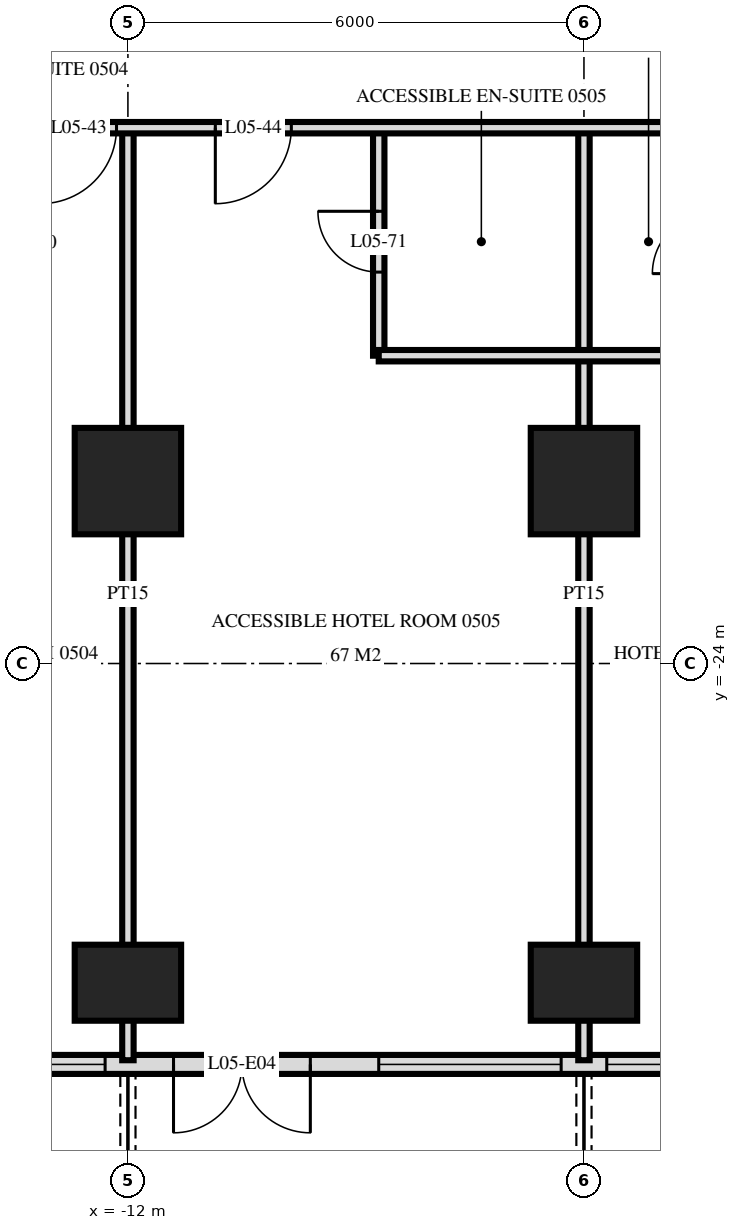
"""IFC4 building model, lengths in metres.
Left out: names, types, materials, properties, quantities, classifications, styles, units other than length and angle.
Written with IfcOpenShell. Run it as: python <this file> out.ifc"""

import sys

from ifc_helpers import new_model, si_unit, direction, frame, frame_2d, origin, origin_2d, place, context, subcontext, project, spatial, rectangle, extrude, element, fill, save


model = new_model("IFC4")
c1 = context("Model", 3, precision=1e-05, world=origin(), true_north=direction((0.0, 1.0)))
c2 = subcontext(c1, "Body", "Model", "MODEL_VIEW")
j1 = project(units=[si_unit("LENGTHUNIT", "METRE"), si_unit("PLANEANGLEUNIT", "RADIAN")], contexts=[c1])
p1 = place(None, origin())
s1 = spatial("IfcSite", under=j1, at=p1, CompositionType="ELEMENT")
p2 = place(p1, origin())
s2 = spatial("IfcBuilding", under=s1, at=p2, CompositionType="ELEMENT")
p3 = place(p2, frame((0.0, 0.0, 27.6)))
s3 = spatial("IfcBuildingStorey", under=s2, at=p3, CompositionType="ELEMENT", Elevation=27.6)
p4 = place(p3, frame((-12.0, -28.2, 0.0), z_axis=(0.0, 0.0, 1.0), x_axis=(1.0, 0.0, 0.0)))
e1 = element("IfcColumn", 1, at=p4, inside=s3, PredefinedType="COLUMN", context=c2, shape_type="SweptSolid", body=[
    extrude(rectangle(XDim=1.4, YDim=1.0, at=origin_2d()), origin(), (0.0, 0.0, 1.0), 3.6),
])
p5 = place(p3, frame((-12.0, -21.6, 0.0), z_axis=(0.0, 0.0, 1.0), x_axis=(1.0, 0.0, 0.0)))
e2 = element("IfcColumn", 2, at=p5, inside=s3, PredefinedType="COLUMN", context=c2, shape_type="SweptSolid", body=[
    extrude(rectangle(XDim=1.4, YDim=1.4, at=origin_2d()), origin(), (0.0, 0.0, 1.0), 3.6),
])
p6 = place(p3, frame((-6.0, -28.2, 0.0), z_axis=(0.0, 0.0, 1.0), x_axis=(1.0, 0.0, 0.0)))
e3 = element("IfcColumn", 3, at=p6, inside=s3, PredefinedType="COLUMN", context=c2, shape_type="SweptSolid", body=[
    extrude(rectangle(XDim=1.4, YDim=1.0, at=origin_2d()), origin(), (0.0, 0.0, 1.0), 3.6),
])
p7 = place(p3, frame((-6.0, -21.6, 0.0), z_axis=(0.0, 0.0, 1.0), x_axis=(1.0, 0.0, 0.0)))
e4 = element("IfcColumn", 4, at=p7, inside=s3, PredefinedType="COLUMN", context=c2, shape_type="SweptSolid", body=[
    extrude(rectangle(XDim=1.4, YDim=1.4, at=origin_2d()), origin(), (0.0, 0.0, 1.0), 3.6),
])
p8 = place(p3, frame((-28.775, -29.275, 0.0), z_axis=(0.0, 0.0, 1.0), x_axis=(1.0, 0.0, 0.0)))
e5 = element("IfcWall", 5, at=p8, inside=s3, PredefinedType="SOLIDWALL", context=c2, shape_type="SweptSolid", body=[
    extrude(rectangle(XDim=57.551, YDim=0.25, at=frame_2d((28.775, 0.0))), origin(), (0.0, 0.0, 1.0), 3.32),
])
p9 = place(p8, frame((0.575, 0.0, 0.0)))
e6 = element("IfcOpeningElement", 6, at=p9, cuts=e5, PredefinedType="OPENING", context=c2, shape_type="SweptSolid", body=[
    extrude(rectangle(XDim=1.8, YDim=2.4, at=frame_2d((0.9, 1.2))), frame((0.0, 0.135, 0.0), z_axis=(0.0, -1.0, 0.0), x_axis=(1.0, 0.0, 0.0)), (0.0, 0.0, 1.0), 0.27),
])
p10 = place(p8, frame((5.375, 0.0, 0.0)))
e7 = element("IfcOpeningElement", 7, at=p10, cuts=e5, PredefinedType="OPENING", context=c2, shape_type="SweptSolid", body=[
    extrude(rectangle(XDim=1.8, YDim=2.4, at=frame_2d((0.9, 1.2))), frame((0.0, 0.135, 0.0), z_axis=(0.0, -1.0, 0.0), x_axis=(1.0, 0.0, 0.0)), (0.0, 0.0, 1.0), 0.27),
])
p11 = place(p8, frame((8.075, 0.0, 0.3)))
e8 = element("IfcOpeningElement", 8, at=p11, cuts=e5, PredefinedType="OPENING", context=c2, shape_type="SweptSolid", body=[
    extrude(rectangle(XDim=2.4, YDim=2.1, at=frame_2d((1.2, 1.05))), frame((0.0, 0.135, 0.0), z_axis=(0.0, -1.0, 0.0), x_axis=(1.0, 0.0, 0.0)), (0.0, 0.0, 1.0), 0.27),
])
p12 = place(p8, frame((11.375, 0.0, 0.0)))
e9 = element("IfcOpeningElement", 9, at=p12, cuts=e5, PredefinedType="OPENING", context=c2, shape_type="SweptSolid", body=[
    extrude(rectangle(XDim=1.8, YDim=2.4, at=frame_2d((0.9, 1.2))), frame((0.0, 0.135, 0.0), z_axis=(0.0, -1.0, 0.0), x_axis=(1.0, 0.0, 0.0)), (0.0, 0.0, 1.0), 0.27),
])
p13 = place(p8, frame((14.075, 0.0, 0.3)))
e10 = element("IfcOpeningElement", 10, at=p13, cuts=e5, PredefinedType="OPENING", context=c2, shape_type="SweptSolid", body=[
    extrude(rectangle(XDim=2.4, YDim=2.1, at=frame_2d((1.2, 1.05))), frame((0.0, 0.135, 0.0), z_axis=(0.0, -1.0, 0.0), x_axis=(1.0, 0.0, 0.0)), (0.0, 0.0, 1.0), 0.27),
])
p14 = place(p8, frame((17.375, 0.0, 0.0)))
e11 = element("IfcOpeningElement", 11, at=p14, cuts=e5, PredefinedType="OPENING", context=c2, shape_type="SweptSolid", body=[
    extrude(rectangle(XDim=1.8, YDim=2.4, at=frame_2d((0.9, 1.2))), frame((0.0, 0.135, 0.0), z_axis=(0.0, -1.0, 0.0), x_axis=(1.0, 0.0, 0.0)), (0.0, 0.0, 1.0), 0.27),
])
p15 = place(p8, frame((20.075, 0.0, 0.3)))
e12 = element("IfcOpeningElement", 12, at=p15, cuts=e5, PredefinedType="OPENING", context=c2, shape_type="SweptSolid", body=[
    extrude(rectangle(XDim=2.4, YDim=2.1, at=frame_2d((1.2, 1.05))), frame((0.0, 0.135, 0.0), z_axis=(0.0, -1.0, 0.0), x_axis=(1.0, 0.0, 0.0)), (0.0, 0.0, 1.0), 0.27),
])
p16 = place(p8, frame((23.075, 0.0, 0.3)))
e13 = element("IfcOpeningElement", 13, at=p16, cuts=e5, PredefinedType="OPENING", context=c2, shape_type="SweptSolid", body=[
    extrude(rectangle(XDim=2.4, YDim=2.1, at=frame_2d((1.2, 1.05))), frame((0.0, 0.135, 0.0), z_axis=(0.0, -1.0, 0.0), x_axis=(1.0, 0.0, 0.0)), (0.0, 0.0, 1.0), 0.27),
])
p17 = place(p8, frame((26.375, 0.0, 0.0)))
e14 = element("IfcOpeningElement", 14, at=p17, cuts=e5, PredefinedType="OPENING", context=c2, shape_type="SweptSolid", body=[
    extrude(rectangle(XDim=1.8, YDim=2.4, at=frame_2d((0.9, 1.2))), frame((0.0, 0.135, 0.0), z_axis=(0.0, -1.0, 0.0), x_axis=(1.0, 0.0, 0.0)), (0.0, 0.0, 1.0), 0.27),
])
p18 = place(p8, frame((29.375, 0.0, 0.0)))
e15 = element("IfcOpeningElement", 15, at=p18, cuts=e5, PredefinedType="OPENING", context=c2, shape_type="SweptSolid", body=[
    extrude(rectangle(XDim=1.8, YDim=2.4, at=frame_2d((0.9, 1.2))), frame((0.0, 0.135, 0.0), z_axis=(0.0, -1.0, 0.0), x_axis=(1.0, 0.0, 0.0)), (0.0, 0.0, 1.0), 0.27),
])
p19 = place(p8, frame((32.075, 0.0, 0.3)))
e16 = element("IfcOpeningElement", 16, at=p19, cuts=e5, PredefinedType="OPENING", context=c2, shape_type="SweptSolid", body=[
    extrude(rectangle(XDim=2.4, YDim=2.1, at=frame_2d((1.2, 1.05))), frame((0.0, 0.135, 0.0), z_axis=(0.0, -1.0, 0.0), x_axis=(1.0, 0.0, 0.0)), (0.0, 0.0, 1.0), 0.27),
])
p20 = place(p8, frame((35.375, 0.0, 0.0)))
e17 = element("IfcOpeningElement", 17, at=p20, cuts=e5, PredefinedType="OPENING", context=c2, shape_type="SweptSolid", body=[
    extrude(rectangle(XDim=1.8, YDim=2.4, at=frame_2d((0.9, 1.2))), frame((0.0, 0.135, 0.0), z_axis=(0.0, -1.0, 0.0), x_axis=(1.0, 0.0, 0.0)), (0.0, 0.0, 1.0), 0.27),
])
p21 = place(p8, frame((38.075, 0.0, 0.3)))
e18 = element("IfcOpeningElement", 18, at=p21, cuts=e5, PredefinedType="OPENING", context=c2, shape_type="SweptSolid", body=[
    extrude(rectangle(XDim=2.4, YDim=2.1, at=frame_2d((1.2, 1.05))), frame((0.0, 0.135, 0.0), z_axis=(0.0, -1.0, 0.0), x_axis=(1.0, 0.0, 0.0)), (0.0, 0.0, 1.0), 0.27),
])
p22 = place(p8, frame((41.375, 0.0, 0.0)))
e19 = element("IfcOpeningElement", 19, at=p22, cuts=e5, PredefinedType="OPENING", context=c2, shape_type="SweptSolid", body=[
    extrude(rectangle(XDim=1.8, YDim=2.4, at=frame_2d((0.9, 1.2))), frame((0.0, 0.135, 0.0), z_axis=(0.0, -1.0, 0.0), x_axis=(1.0, 0.0, 0.0)), (0.0, 0.0, 1.0), 0.27),
])
p23 = place(p8, frame((44.075, 0.0, 0.3)))
e20 = element("IfcOpeningElement", 20, at=p23, cuts=e5, PredefinedType="OPENING", context=c2, shape_type="SweptSolid", body=[
    extrude(rectangle(XDim=2.4, YDim=2.1, at=frame_2d((1.2, 1.05))), frame((0.0, 0.135, 0.0), z_axis=(0.0, -1.0, 0.0), x_axis=(1.0, 0.0, 0.0)), (0.0, 0.0, 1.0), 0.27),
])
p24 = place(p8, frame((47.075, 0.0, 0.3)))
e21 = element("IfcOpeningElement", 21, at=p24, cuts=e5, PredefinedType="OPENING", context=c2, shape_type="SweptSolid", body=[
    extrude(rectangle(XDim=2.4, YDim=2.1, at=frame_2d((1.2, 1.05))), frame((0.0, 0.135, 0.0), z_axis=(0.0, -1.0, 0.0), x_axis=(1.0, 0.0, 0.0)), (0.0, 0.0, 1.0), 0.27),
])
p25 = place(p8, frame((50.375, 0.0, 0.0)))
e22 = element("IfcOpeningElement", 22, at=p25, cuts=e5, PredefinedType="OPENING", context=c2, shape_type="SweptSolid", body=[
    extrude(rectangle(XDim=1.8, YDim=2.4, at=frame_2d((0.9, 1.2))), frame((0.0, 0.135, 0.0), z_axis=(0.0, -1.0, 0.0), x_axis=(1.0, 0.0, 0.0)), (0.0, 0.0, 1.0), 0.27),
])
p26 = place(p8, frame((53.375, 0.0, 0.0)))
e23 = element("IfcOpeningElement", 23, at=p26, cuts=e5, PredefinedType="OPENING", context=c2, shape_type="SweptSolid", body=[
    extrude(rectangle(XDim=1.8, YDim=2.4, at=frame_2d((0.9, 1.2))), frame((0.0, 0.135, 0.0), z_axis=(0.0, -1.0, 0.0), x_axis=(1.0, 0.0, 0.0)), (0.0, 0.0, 1.0), 0.27),
])
p27 = place(p3, frame((-6.0, -29.22, 0.0), z_axis=(0.0, 0.0, 1.0), x_axis=(0.0, 1.0, 0.0)))
e24 = element("IfcWall", 24, at=p27, inside=s3, PredefinedType="PARTITIONING", context=c2, shape_type="SweptSolid", body=[
    extrude(rectangle(XDim=12.27, YDim=0.15, at=frame_2d((6.135, 0.0))), origin(), (0.0, 0.0, 1.0), 3.32),
])
p28 = place(p3, frame((-8.7, -19.95, 0.0), z_axis=(0.0, 0.0, 1.0), x_axis=(0.0, 1.0, 0.0)))
e25 = element("IfcWall", 25, at=p28, inside=s3, PredefinedType="PARTITIONING", context=c2, shape_type="SweptSolid", body=[
    extrude(rectangle(XDim=3.0, YDim=0.15, at=frame_2d((1.5, 0.0))), origin(), (0.0, 0.0, 1.0), 3.32),
])
p29 = place(p28, frame((1.1, 0.0, 0.0)))
e26 = element("IfcOpeningElement", 26, at=p29, cuts=e25, PredefinedType="OPENING", context=c2, shape_type="SweptSolid", body=[
    extrude(rectangle(XDim=0.8, YDim=2.1, at=frame_2d((0.4, 1.05))), frame((0.0, 0.085, 0.0), z_axis=(0.0, -1.0, 0.0), x_axis=(1.0, 0.0, 0.0)), (0.0, 0.0, 1.0), 0.17),
])
p30 = place(p3, frame((-12.0, -29.22, 0.0), z_axis=(0.0, 0.0, 1.0), x_axis=(0.0, 1.0, 0.0)))
e27 = element("IfcWall", 27, at=p30, inside=s3, PredefinedType="PARTITIONING", context=c2, shape_type="SweptSolid", body=[
    extrude(rectangle(XDim=12.27, YDim=0.15, at=frame_2d((6.135, 0.0))), origin(), (0.0, 0.0, 1.0), 3.32),
])
p31 = place(p3, frame((-8.7, -19.95, 0.0), z_axis=(0.0, 0.0, 1.0), x_axis=(1.0, 0.0, 0.0)))
e28 = element("IfcWall", 28, at=p31, inside=s3, PredefinedType="PARTITIONING", context=c2, shape_type="SweptSolid", body=[
    extrude(rectangle(XDim=4.4, YDim=0.15, at=frame_2d((2.2, 0.0))), origin(), (0.0, 0.0, 1.0), 3.32),
])
p32 = place(p3, frame((-33.12, -16.95, 0.0), z_axis=(0.0, 0.0, 1.0), x_axis=(1.0, 0.0, 0.0)))
e29 = element("IfcWall", 29, at=p32, inside=s3, PredefinedType="PARTITIONING", context=c2, shape_type="SweptSolid", body=[
    extrude(rectangle(XDim=66.24, YDim=0.15, at=frame_2d((33.12, 0.0))), origin(), (0.0, 0.0, 1.0), 3.32),
])
p33 = place(p32, frame((9.27, 0.0, 0.0)))
e30 = element("IfcOpeningElement", 30, at=p33, cuts=e29, PredefinedType="OPENING", context=c2, shape_type="SweptSolid", body=[
    extrude(rectangle(XDim=1.0, YDim=2.1, at=frame_2d((0.5, 1.05))), frame((0.0, 0.085, 0.0), z_axis=(0.0, -1.0, 0.0), x_axis=(1.0, 0.0, 0.0)), (0.0, 0.0, 1.0), 0.17),
])
p34 = place(p32, frame((13.97, 0.0, 0.0)))
e31 = element("IfcOpeningElement", 31, at=p34, cuts=e29, PredefinedType="OPENING", context=c2, shape_type="SweptSolid", body=[
    extrude(rectangle(XDim=1.0, YDim=2.1, at=frame_2d((0.5, 1.05))), frame((0.0, 0.085, 0.0), z_axis=(0.0, -1.0, 0.0), x_axis=(1.0, 0.0, 0.0)), (0.0, 0.0, 1.0), 0.17),
])
p35 = place(p32, frame((15.27, 0.0, 0.0)))
e32 = element("IfcOpeningElement", 32, at=p35, cuts=e29, PredefinedType="OPENING", context=c2, shape_type="SweptSolid", body=[
    extrude(rectangle(XDim=1.0, YDim=2.1, at=frame_2d((0.5, 1.05))), frame((0.0, 0.085, 0.0), z_axis=(0.0, -1.0, 0.0), x_axis=(1.0, 0.0, 0.0)), (0.0, 0.0, 1.0), 0.17),
])
p36 = place(p32, frame((19.97, 0.0, 0.0)))
e33 = element("IfcOpeningElement", 33, at=p36, cuts=e29, PredefinedType="OPENING", context=c2, shape_type="SweptSolid", body=[
    extrude(rectangle(XDim=1.0, YDim=2.1, at=frame_2d((0.5, 1.05))), frame((0.0, 0.085, 0.0), z_axis=(0.0, -1.0, 0.0), x_axis=(1.0, 0.0, 0.0)), (0.0, 0.0, 1.0), 0.17),
])
p37 = place(p32, frame((22.27, 0.0, 0.0)))
e34 = element("IfcOpeningElement", 34, at=p37, cuts=e29, PredefinedType="OPENING", context=c2, shape_type="SweptSolid", body=[
    extrude(rectangle(XDim=1.0, YDim=2.1, at=frame_2d((0.5, 1.05))), frame((0.0, 0.085, 0.0), z_axis=(0.0, -1.0, 0.0), x_axis=(1.0, 0.0, 0.0)), (0.0, 0.0, 1.0), 0.17),
])
p38 = place(p32, frame((28.97, 0.0, 0.0)))
e35 = element("IfcOpeningElement", 35, at=p38, cuts=e29, PredefinedType="OPENING", context=c2, shape_type="SweptSolid", body=[
    extrude(rectangle(XDim=1.0, YDim=2.1, at=frame_2d((0.5, 1.05))), frame((0.0, 0.085, 0.0), z_axis=(0.0, -1.0, 0.0), x_axis=(1.0, 0.0, 0.0)), (0.0, 0.0, 1.0), 0.17),
])
p39 = place(p32, frame((30.27, 0.0, 0.0)))
e36 = element("IfcOpeningElement", 36, at=p39, cuts=e29, PredefinedType="OPENING", context=c2, shape_type="SweptSolid", body=[
    extrude(rectangle(XDim=1.0, YDim=2.1, at=frame_2d((0.5, 1.05))), frame((0.0, 0.085, 0.0), z_axis=(0.0, -1.0, 0.0), x_axis=(1.0, 0.0, 0.0)), (0.0, 0.0, 1.0), 0.17),
])
p40 = place(p32, frame((34.97, 0.0, 0.0)))
e37 = element("IfcOpeningElement", 37, at=p40, cuts=e29, PredefinedType="OPENING", context=c2, shape_type="SweptSolid", body=[
    extrude(rectangle(XDim=1.0, YDim=2.1, at=frame_2d((0.5, 1.05))), frame((0.0, 0.085, 0.0), z_axis=(0.0, -1.0, 0.0), x_axis=(1.0, 0.0, 0.0)), (0.0, 0.0, 1.0), 0.17),
])
p41 = place(p32, frame((36.27, 0.0, 0.0)))
e38 = element("IfcOpeningElement", 38, at=p41, cuts=e29, PredefinedType="OPENING", context=c2, shape_type="SweptSolid", body=[
    extrude(rectangle(XDim=1.0, YDim=2.1, at=frame_2d((0.5, 1.05))), frame((0.0, 0.085, 0.0), z_axis=(0.0, -1.0, 0.0), x_axis=(1.0, 0.0, 0.0)), (0.0, 0.0, 1.0), 0.17),
])
p42 = place(p32, frame((40.97, 0.0, 0.0)))
e39 = element("IfcOpeningElement", 39, at=p42, cuts=e29, PredefinedType="OPENING", context=c2, shape_type="SweptSolid", body=[
    extrude(rectangle(XDim=1.0, YDim=2.1, at=frame_2d((0.5, 1.05))), frame((0.0, 0.085, 0.0), z_axis=(0.0, -1.0, 0.0), x_axis=(1.0, 0.0, 0.0)), (0.0, 0.0, 1.0), 0.17),
])
p43 = place(p32, frame((42.27, 0.0, 0.0)))
e40 = element("IfcOpeningElement", 40, at=p43, cuts=e29, PredefinedType="OPENING", context=c2, shape_type="SweptSolid", body=[
    extrude(rectangle(XDim=1.0, YDim=2.1, at=frame_2d((0.5, 1.05))), frame((0.0, 0.085, 0.0), z_axis=(0.0, -1.0, 0.0), x_axis=(1.0, 0.0, 0.0)), (0.0, 0.0, 1.0), 0.17),
])
p44 = place(p32, frame((46.97, 0.0, 0.0)))
e41 = element("IfcOpeningElement", 41, at=p44, cuts=e29, PredefinedType="OPENING", context=c2, shape_type="SweptSolid", body=[
    extrude(rectangle(XDim=1.0, YDim=2.1, at=frame_2d((0.5, 1.05))), frame((0.0, 0.085, 0.0), z_axis=(0.0, -1.0, 0.0), x_axis=(1.0, 0.0, 0.0)), (0.0, 0.0, 1.0), 0.17),
])
p45 = place(p32, frame((48.27, 0.0, 0.0)))
e42 = element("IfcOpeningElement", 42, at=p45, cuts=e29, PredefinedType="OPENING", context=c2, shape_type="SweptSolid", body=[
    extrude(rectangle(XDim=1.0, YDim=2.1, at=frame_2d((0.5, 1.05))), frame((0.0, 0.085, 0.0), z_axis=(0.0, -1.0, 0.0), x_axis=(1.0, 0.0, 0.0)), (0.0, 0.0, 1.0), 0.17),
])
p46 = place(p32, frame((52.97, 0.0, 0.0)))
e43 = element("IfcOpeningElement", 43, at=p46, cuts=e29, PredefinedType="OPENING", context=c2, shape_type="SweptSolid", body=[
    extrude(rectangle(XDim=1.0, YDim=2.1, at=frame_2d((0.5, 1.05))), frame((0.0, 0.085, 0.0), z_axis=(0.0, -1.0, 0.0), x_axis=(1.0, 0.0, 0.0)), (0.0, 0.0, 1.0), 0.17),
])
p47 = place(p32, frame((54.27, 0.0, 0.0)))
e44 = element("IfcOpeningElement", 44, at=p47, cuts=e29, PredefinedType="OPENING", context=c2, shape_type="SweptSolid", body=[
    extrude(rectangle(XDim=1.0, YDim=2.1, at=frame_2d((0.5, 1.05))), frame((0.0, 0.085, 0.0), z_axis=(0.0, -1.0, 0.0), x_axis=(1.0, 0.0, 0.0)), (0.0, 0.0, 1.0), 0.17),
])
p48 = place(p32, frame((4.4, 0.0, 0.0)))
e45 = element("IfcOpeningElement", 45, at=p48, cuts=e29, PredefinedType="OPENING", context=c2, shape_type="SweptSolid", body=[
    extrude(rectangle(XDim=1.0, YDim=2.1, at=frame_2d((0.5, 1.05))), frame((0.0, 0.085, 0.0), z_axis=(0.0, -1.0, 0.0), x_axis=(1.0, 0.0, 0.0)), (0.0, 0.0, 1.0), 0.17),
])
p49 = place(p32, frame((60.8, 0.0, 0.0)))
e46 = element("IfcOpeningElement", 46, at=p49, cuts=e29, PredefinedType="OPENING", context=c2, shape_type="SweptSolid", body=[
    extrude(rectangle(XDim=1.0, YDim=2.1, at=frame_2d((0.5, 1.05))), frame((0.0, 0.085, 0.0), z_axis=(0.0, -1.0, 0.0), x_axis=(1.0, 0.0, 0.0)), (0.0, 0.0, 1.0), 0.17),
])
p50 = place(p13, origin())
e47 = element("IfcWindow", 47, at=p50, inside=s3, PartitioningType="SINGLE_PANEL", PredefinedType="WINDOW", context=c2, shape_type="SweptSolid", body=[
    extrude(rectangle(XDim=2.4, YDim=2.1, at=frame_2d((1.2, 1.05))), frame((0.0, 0.03, 0.0), z_axis=(0.0, -1.0, 0.0), x_axis=(1.0, 0.0, 0.0)), (0.0, 0.0, 1.0), 0.06),
])
fill(e10, e47)
p51 = place(p14, frame((0.9, 0.0, 0.0), z_axis=(0.0, 0.0, 1.0), x_axis=(-1.0, 0.0, 0.0)))
e48 = element("IfcDoor", 48, at=p51, inside=s3, OperationType="DOUBLE_DOOR_SINGLE_SWING", PredefinedType="DOOR", context=c2, shape_type="SweptSolid", body=[
    extrude(rectangle(XDim=1.8, YDim=2.4, at=frame_2d((0.0, 1.2))), frame((0.0, -0.025, 0.0), z_axis=(0.0, 1.0, 0.0), x_axis=(-1.0, 0.0, 0.0)), (0.0, 0.0, 1.0), 0.05),
])
fill(e11, e48)
p52 = place(p15, origin())
e49 = element("IfcWindow", 49, at=p52, inside=s3, PartitioningType="SINGLE_PANEL", PredefinedType="WINDOW", context=c2, shape_type="SweptSolid", body=[
    extrude(rectangle(XDim=2.4, YDim=2.1, at=frame_2d((1.2, 1.05))), frame((0.0, 0.03, 0.0), z_axis=(0.0, -1.0, 0.0), x_axis=(1.0, 0.0, 0.0)), (0.0, 0.0, 1.0), 0.06),
])
fill(e12, e49)
p53 = place(p16, origin())
e50 = element("IfcWindow", 50, at=p53, inside=s3, PartitioningType="SINGLE_PANEL", PredefinedType="WINDOW", context=c2, shape_type="SweptSolid", body=[
    extrude(rectangle(XDim=2.4, YDim=2.1, at=frame_2d((1.2, 1.05))), frame((0.0, 0.03, 0.0), z_axis=(0.0, -1.0, 0.0), x_axis=(1.0, 0.0, 0.0)), (0.0, 0.0, 1.0), 0.06),
])
fill(e13, e50)
p54 = place(p36, frame((0.5, 0.0, 0.0), z_axis=(0.0, 0.0, 1.0), x_axis=(-1.0, 0.0, 0.0)))
e51 = element("IfcDoor", 51, at=p54, inside=s3, OperationType="SINGLE_SWING_LEFT", PredefinedType="DOOR", context=c2, shape_type="SweptSolid", body=[
    extrude(rectangle(XDim=1.0, YDim=2.1, at=frame_2d((0.0, 1.05))), frame((0.0, -0.025, 0.0), z_axis=(0.0, 1.0, 0.0), x_axis=(-1.0, 0.0, 0.0)), (0.0, 0.0, 1.0), 0.05),
])
fill(e33, e51)
p55 = place(p37, frame((0.5, 0.0, 0.0), z_axis=(0.0, 0.0, 1.0), x_axis=(-1.0, 0.0, 0.0)))
e52 = element("IfcDoor", 52, at=p55, inside=s3, OperationType="SINGLE_SWING_LEFT", PredefinedType="DOOR", context=c2, shape_type="SweptSolid", body=[
    extrude(rectangle(XDim=1.0, YDim=2.1, at=frame_2d((0.0, 1.05))), frame((0.0, -0.025, 0.0), z_axis=(0.0, 1.0, 0.0), x_axis=(-1.0, 0.0, 0.0)), (0.0, 0.0, 1.0), 0.05),
])
fill(e34, e52)
p56 = place(p29, origin())
e53 = element("IfcDoor", 53, at=p56, inside=s3, OperationType="SINGLE_SWING_LEFT", PredefinedType="DOOR", context=c2, shape_type="SweptSolid", body=[
    extrude(rectangle(XDim=0.8, YDim=2.1, at=frame_2d((0.4, 1.05))), frame((0.0, 0.025, 0.0), z_axis=(0.0, -1.0, 0.0), x_axis=(1.0, 0.0, 0.0)), (0.0, 0.0, 1.0), 0.05),
])
fill(e26, e53)
save(model, sys.argv[1])
